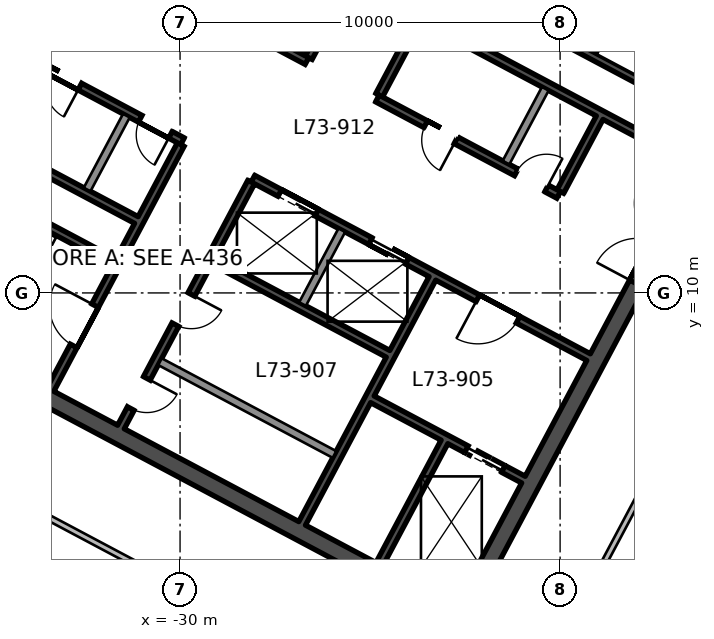
"""IFC4 building model, lengths in metres.
Left out: names, types, materials, properties, quantities, classifications, styles, units other than length and angle.
Written with IfcOpenShell. Run it as: python <this file> out.ifc"""

import sys

from ifc_helpers import new_model, si_unit, direction, frame, frame_2d, origin, place, context, subcontext, project, spatial, rectangle, extrude, element, fill, save


model = new_model("IFC4")
c1 = context("Model", 3, precision=1e-05, world=origin(), true_north=direction((0.0, 1.0)))
c2 = subcontext(c1, "Body", "Model", "MODEL_VIEW")
j1 = project(units=[si_unit("LENGTHUNIT", "METRE"), si_unit("PLANEANGLEUNIT", "RADIAN")], contexts=[c1])
p1 = place(None, origin())
s1 = spatial("IfcSite", under=j1, at=p1, CompositionType="ELEMENT")
p2 = place(p1, origin())
s2 = spatial("IfcBuilding", under=s1, at=p2, CompositionType="ELEMENT")
p3 = place(p2, frame((0.0, 0.0, 320.4)))
s3 = spatial("IfcBuildingStorey", under=s2, at=p3, CompositionType="ELEMENT", Elevation=320.4)
p4 = place(p3, frame((-13.771, 18.138, 0.0), z_axis=(0.0, 0.0, 1.0), x_axis=(-0.469467968382, -0.882949504028, 0.0)))
e1 = element("IfcWall", 1, at=p4, inside=s3, PredefinedType="SHEAR", context=c2, shape_type="SweptSolid", body=[
    extrude(rectangle(XDim=19.1, YDim=0.45, at=frame_2d((9.55, 0.0))), origin(), (0.0, 0.0, 1.0), 3.9),
])
p5 = place(p4, frame((6.55, 0.0, 0.0)))
e2 = element("IfcOpeningElement", 2, at=p5, cuts=e1, PredefinedType="OPENING", context=c2, shape_type="SweptSolid", body=[
    extrude(rectangle(XDim=2.4, YDim=2.4, at=frame_2d((1.2, 1.2))), frame((0.0, 0.235, 0.0), z_axis=(0.0, -1.0, 0.0), x_axis=(1.0, 0.0, 0.0)), (0.0, 0.0, 1.0), 0.47),
])
p6 = place(p3, frame((-32.004, 27.833, 0.0), z_axis=(0.0, 0.0, 1.0), x_axis=(-0.469467968382, -0.882949504028, 0.0)))
e3 = element("IfcWall", 3, at=p6, inside=s3, PredefinedType="SHEAR", context=c2, shape_type="SweptSolid", body=[
    extrude(rectangle(XDim=19.1, YDim=0.45, at=frame_2d((9.55, 0.0))), origin(), (0.0, 0.0, 1.0), 3.9),
])
p7 = place(p6, frame((10.15, 0.0, 0.0)))
e4 = element("IfcOpeningElement", 4, at=p7, cuts=e3, PredefinedType="OPENING", context=c2, shape_type="SweptSolid", body=[
    extrude(rectangle(XDim=2.4, YDim=2.4, at=frame_2d((1.2, 1.2))), frame((0.0, 0.235, 0.0), z_axis=(0.0, -1.0, 0.0), x_axis=(1.0, 0.0, 0.0)), (0.0, 0.0, 1.0), 0.47),
])
p8 = place(p3, frame((-22.832, 1.578, 0.0), z_axis=(0.0, 0.0, 1.0), x_axis=(-0.88294509198, 0.469476266226, 0.0)))
e5 = element("IfcWall", 5, at=p8, inside=s3, PredefinedType="SHEAR", context=c2, shape_type="SweptSolid", body=[
    extrude(rectangle(XDim=20.2, YDim=0.45, at=frame_2d((10.1, 0.0))), origin(), (0.0, 0.0, 1.0), 3.9),
])
p9 = place(p3, frame((-23.043, 6.08, 0.0), z_axis=(0.0, 0.0, 1.0), x_axis=(-0.469494272526, -0.882935517501, 0.0)))
e6 = element("IfcWall", 6, at=p9, inside=s3, PredefinedType="SHEAR", context=c2, shape_type="SweptSolid", body=[
    extrude(rectangle(XDim=3.65, YDim=0.2, at=frame_2d((1.825, 0.0))), origin(), (0.0, 0.0, 1.0), 3.9),
])
p10 = place(p3, frame((-18.96, 14.611, 0.0), z_axis=(0.0, 0.0, 1.0), x_axis=(-0.4694473164, -0.882960484464, 0.0)))
e7 = element("IfcWall", 7, at=p10, inside=s3, PredefinedType="SHEAR", context=c2, shape_type="SweptSolid", body=[
    extrude(rectangle(XDim=2.2, YDim=0.2, at=frame_2d((1.1, 0.0))), origin(), (0.0, 0.0, 1.0), 3.9),
])
p11 = place(p3, frame((-20.39, 15.372, 0.0), z_axis=(0.0, 0.0, 1.0), x_axis=(-0.4694473164, -0.882960484464, 0.0)))
e8 = element("IfcWall", 8, at=p11, inside=s3, PredefinedType="SOLIDWALL", context=c2, shape_type="SweptSolid", body=[
    extrude(rectangle(XDim=2.2, YDim=0.2, at=frame_2d((1.1, 0.0))), origin(), (0.0, 0.0, 1.0), 3.9),
])
p12 = place(p3, frame((-23.36, 10.382, 0.0), z_axis=(0.0, 0.0, 1.0), x_axis=(-0.469480409012, -0.88294288918, 0.0)))
e9 = element("IfcWall", 9, at=p12, inside=s3, PredefinedType="SHEAR", context=c2, shape_type="SweptSolid", body=[
    extrude(rectangle(XDim=7.3, YDim=0.2, at=frame_2d((3.65, 0.0))), origin(), (0.0, 0.0, 1.0), 3.9),
])
p13 = place(p3, frame((-25.744, 11.65, 0.0), z_axis=(0.0, 0.0, 1.0), x_axis=(-0.469487830541, -0.882938942948, 0.0)))
e10 = element("IfcWall", 10, at=p13, inside=s3, PredefinedType="SOLIDWALL", context=c2, shape_type="SweptSolid", body=[
    extrude(rectangle(XDim=2.2, YDim=0.2, at=frame_2d((1.1, 0.0))), origin(), (0.0, 0.0, 1.0), 3.9),
])
p14 = place(p3, frame((-21.333, 21.649, 0.0), z_axis=(0.0, 0.0, 1.0), x_axis=(-0.469494272526, -0.882935517501, 0.0)))
e11 = element("IfcWall", 11, at=p14, inside=s3, PredefinedType="SHEAR", context=c2, shape_type="SweptSolid", body=[
    extrude(rectangle(XDim=7.3, YDim=0.2, at=frame_2d((3.65, 0.0))), origin(), (0.0, 0.0, 1.0), 3.9),
])
p15 = place(p14, frame((1.3, 0.0, 0.0)))
e12 = element("IfcOpeningElement", 12, at=p15, cuts=e11, PredefinedType="OPENING", context=c2, shape_type="SweptSolid", body=[
    extrude(rectangle(XDim=1.2, YDim=2.1, at=frame_2d((0.6, 1.05))), frame((0.0, 0.11, 0.0), z_axis=(0.0, -1.0, 0.0), x_axis=(1.0, 0.0, 0.0)), (0.0, 0.0, 1.0), 0.22),
])
p16 = place(p3, frame((-28.128, 12.917, 0.0), z_axis=(0.0, 0.0, 1.0), x_axis=(-0.469454336211, -0.882956752176, 0.0)))
e13 = element("IfcWall", 13, at=p16, inside=s3, PredefinedType="SHEAR", context=c2, shape_type="SweptSolid", body=[
    extrude(rectangle(XDim=7.3, YDim=0.2, at=frame_2d((3.65, 0.0))), origin(), (0.0, 0.0, 1.0), 3.9),
])
p17 = place(p16, frame((3.35, 0.0, 0.0)))
e14 = element("IfcOpeningElement", 14, at=p17, cuts=e13, PredefinedType="OPENING", context=c2, shape_type="SweptSolid", body=[
    extrude(rectangle(XDim=0.9, YDim=2.1, at=frame_2d((0.45, 1.05))), frame((0.0, 0.11, 0.0), z_axis=(0.0, -1.0, 0.0), x_axis=(1.0, 0.0, 0.0)), (0.0, 0.0, 1.0), 0.22),
])
p18 = place(p16, frame((5.85, 0.0, 0.0)))
e15 = element("IfcOpeningElement", 15, at=p18, cuts=e13, PredefinedType="OPENING", context=c2, shape_type="SweptSolid", body=[
    extrude(rectangle(XDim=0.9, YDim=2.1, at=frame_2d((0.45, 1.05))), frame((0.0, 0.11, 0.0), z_axis=(0.0, -1.0, 0.0), x_axis=(1.0, 0.0, 0.0)), (0.0, 0.0, 1.0), 0.22),
])
p19 = place(p3, frame((-23.188, 22.635, 0.0), z_axis=(0.0, 0.0, 1.0), x_axis=(-0.469454336211, -0.882956752176, 0.0)))
e16 = element("IfcWall", 16, at=p19, inside=s3, PredefinedType="SHEAR", context=c2, shape_type="SweptSolid", body=[
    extrude(rectangle(XDim=7.3, YDim=0.2, at=frame_2d((3.65, 0.0))), origin(), (0.0, 0.0, 1.0), 3.9),
])
p20 = place(p19, frame((0.55, 0.0, 0.0)))
e17 = element("IfcOpeningElement", 17, at=p20, cuts=e16, PredefinedType="OPENING", context=c2, shape_type="SweptSolid", body=[
    extrude(rectangle(XDim=0.9, YDim=2.1, at=frame_2d((0.45, 1.05))), frame((0.0, 0.11, 0.0), z_axis=(0.0, -1.0, 0.0), x_axis=(1.0, 0.0, 0.0)), (0.0, 0.0, 1.0), 0.22),
])
p21 = place(p19, frame((2.3, 0.0, 0.0)))
e18 = element("IfcOpeningElement", 18, at=p21, cuts=e16, PredefinedType="OPENING", context=c2, shape_type="SweptSolid", body=[
    extrude(rectangle(XDim=0.9, YDim=2.1, at=frame_2d((0.45, 1.05))), frame((0.0, 0.11, 0.0), z_axis=(0.0, -1.0, 0.0), x_axis=(1.0, 0.0, 0.0)), (0.0, 0.0, 1.0), 0.22),
])
p22 = place(p19, frame((3.8, 0.0, 0.0)))
e19 = element("IfcOpeningElement", 19, at=p22, cuts=e16, PredefinedType="OPENING", context=c2, shape_type="SweptSolid", body=[
    extrude(rectangle(XDim=0.9, YDim=2.1, at=frame_2d((0.45, 1.05))), frame((0.0, 0.11, 0.0), z_axis=(0.0, -1.0, 0.0), x_axis=(1.0, 0.0, 0.0)), (0.0, 0.0, 1.0), 0.22),
])
p23 = place(p3, frame((-29.982, 13.903, 0.0), z_axis=(0.0, 0.0, 1.0), x_axis=(-0.469454336211, -0.882956752176, 0.0)))
e20 = element("IfcWall", 20, at=p23, inside=s3, PredefinedType="SHEAR", context=c2, shape_type="SweptSolid", body=[
    extrude(rectangle(XDim=7.3, YDim=0.2, at=frame_2d((3.65, 0.0))), origin(), (0.0, 0.0, 1.0), 3.9),
])
p24 = place(p23, frame((4.8, 0.0, 0.0)))
e21 = element("IfcOpeningElement", 21, at=p24, cuts=e20, PredefinedType="OPENING", context=c2, shape_type="SweptSolid", body=[
    extrude(rectangle(XDim=1.2, YDim=2.1, at=frame_2d((0.6, 1.05))), frame((0.0, 0.11, 0.0), z_axis=(0.0, -1.0, 0.0), x_axis=(1.0, 0.0, 0.0)), (0.0, 0.0, 1.0), 0.22),
])
p25 = place(p3, frame((-31.413, 14.664, 0.0), z_axis=(0.0, 0.0, 1.0), x_axis=(-0.469533832133, -0.882914480843, 0.0)))
e22 = element("IfcWall", 22, at=p25, inside=s3, PredefinedType="SOLIDWALL", context=c2, shape_type="SweptSolid", body=[
    extrude(rectangle(XDim=2.2, YDim=0.2, at=frame_2d((1.1, 0.0))), origin(), (0.0, 0.0, 1.0), 3.9),
])
p26 = place(p3, frame((-15.942, 14.536, 0.0), z_axis=(0.0, 0.0, 1.0), x_axis=(-0.882946947542, 0.469472776449, 0.0)))
e23 = element("IfcWall", 23, at=p26, inside=s3, PredefinedType="SHEAR", context=c2, shape_type="SweptSolid", body=[
    extrude(rectangle(XDim=8.0, YDim=0.2, at=frame_2d((4.0, 0.0))), origin(), (0.0, 0.0, 1.0), 3.9),
])
p27 = place(p3, frame((-16.529, 13.432, 0.0), z_axis=(0.0, 0.0, 1.0), x_axis=(-0.88295287151, 0.469461634952, 0.0)))
e24 = element("IfcWall", 24, at=p27, inside=s3, PredefinedType="SHEAR", context=c2, shape_type="SweptSolid", body=[
    extrude(rectangle(XDim=8.0, YDim=0.2, at=frame_2d((4.0, 0.0))), origin(), (0.0, 0.0, 1.0), 3.9),
])
p28 = place(p3, frame((-20.04, 12.581, 0.0), z_axis=(0.0, 0.0, 1.0), x_axis=(-0.882942972946, 0.469480251476, 0.0)))
e25 = element("IfcWall", 25, at=p28, inside=s3, PredefinedType="SHEAR", context=c2, shape_type="SweptSolid", body=[
    extrude(rectangle(XDim=5.4, YDim=0.2, at=frame_2d((2.7, 0.0))), origin(), (0.0, 0.0, 1.0), 3.9),
])
p29 = place(p28, frame((0.36, 0.0, 0.0)))
e26 = element("IfcOpeningElement", 26, at=p29, cuts=e25, PredefinedType="OPENING", context=c2, shape_type="SweptSolid", body=[
    extrude(rectangle(XDim=0.9, YDim=2.1, at=frame_2d((0.45, 1.05))), frame((0.0, 0.11, 0.0), z_axis=(0.0, -1.0, 0.0), x_axis=(1.0, 0.0, 0.0)), (0.0, 0.0, 1.0), 0.22),
])
p30 = place(p28, frame((3.06, 0.0, 0.0)))
e27 = element("IfcOpeningElement", 27, at=p30, cuts=e25, PredefinedType="OPENING", context=c2, shape_type="SweptSolid", body=[
    extrude(rectangle(XDim=0.9, YDim=2.1, at=frame_2d((0.45, 1.05))), frame((0.0, 0.11, 0.0), z_axis=(0.0, -1.0, 0.0), x_axis=(1.0, 0.0, 0.0)), (0.0, 0.0, 1.0), 0.22),
])
p31 = place(p3, frame((-26.662, 16.102, 0.0), z_axis=(0.0, 0.0, 1.0), x_axis=(-0.882940221191, 0.469485426614, 0.0)))
e28 = element("IfcWall", 28, at=p31, inside=s3, PredefinedType="SHEAR", context=c2, shape_type="SweptSolid", body=[
    extrude(rectangle(XDim=10.0, YDim=0.2, at=frame_2d((5.0, 0.0))), origin(), (0.0, 0.0, 1.0), 3.9),
])
p32 = place(p31, frame((6.3, 0.0, 0.0)))
e29 = element("IfcOpeningElement", 29, at=p32, cuts=e28, PredefinedType="OPENING", context=c2, shape_type="SweptSolid", body=[
    extrude(rectangle(XDim=1.2, YDim=2.1, at=frame_2d((0.6, 1.05))), frame((0.0, 0.11, 0.0), z_axis=(0.0, -1.0, 0.0), x_axis=(1.0, 0.0, 0.0)), (0.0, 0.0, 1.0), 0.22),
])
p33 = place(p31, frame((0.8, 0.0, 0.0)))
e30 = element("IfcOpeningElement", 30, at=p33, cuts=e28, PredefinedType="OPENING", context=c2, shape_type="SweptSolid", body=[
    extrude(rectangle(XDim=1.1, YDim=2.1, at=frame_2d((0.55, 1.05))), frame((0.0, 0.11, 0.0), z_axis=(0.0, -1.0, 0.0), x_axis=(1.0, 0.0, 0.0)), (0.0, 0.0, 1.0), 0.22),
])
p34 = place(p31, frame((3.5, 0.0, 0.0)))
e31 = element("IfcOpeningElement", 31, at=p34, cuts=e28, PredefinedType="OPENING", context=c2, shape_type="SweptSolid", body=[
    extrude(rectangle(XDim=1.1, YDim=2.1, at=frame_2d((0.55, 1.05))), frame((0.0, 0.11, 0.0), z_axis=(0.0, -1.0, 0.0), x_axis=(1.0, 0.0, 0.0)), (0.0, 0.0, 1.0), 0.22),
])
p35 = place(p3, frame((-19.252, 8.311, 0.0), z_axis=(0.0, 0.0, 1.0), x_axis=(-0.882955722218, 0.469456273365, 0.0)))
e32 = element("IfcWall", 32, at=p35, inside=s3, PredefinedType="SHEAR", context=c2, shape_type="SweptSolid", body=[
    extrude(rectangle(XDim=10.0, YDim=0.2, at=frame_2d((5.0, 0.0))), origin(), (0.0, 0.0, 1.0), 3.9),
])
p36 = place(p35, frame((2.1, 0.0, 0.0)))
e33 = element("IfcOpeningElement", 33, at=p36, cuts=e32, PredefinedType="OPENING", context=c2, shape_type="SweptSolid", body=[
    extrude(rectangle(XDim=1.2, YDim=2.1, at=frame_2d((0.6, 1.05))), frame((0.0, 0.11, 0.0), z_axis=(0.0, -1.0, 0.0), x_axis=(1.0, 0.0, 0.0)), (0.0, 0.0, 1.0), 0.22),
])
p37 = place(p35, frame((5.4, 0.0, 0.0)))
e34 = element("IfcOpeningElement", 34, at=p37, cuts=e32, PredefinedType="OPENING", context=c2, shape_type="SweptSolid", body=[
    extrude(rectangle(XDim=1.1, YDim=2.1, at=frame_2d((0.55, 1.05))), frame((0.0, 0.11, 0.0), z_axis=(0.0, -1.0, 0.0), x_axis=(1.0, 0.0, 0.0)), (0.0, 0.0, 1.0), 0.22),
])
p38 = place(p35, frame((8.1, 0.0, 0.0)))
e35 = element("IfcOpeningElement", 35, at=p38, cuts=e32, PredefinedType="OPENING", context=c2, shape_type="SweptSolid", body=[
    extrude(rectangle(XDim=1.1, YDim=2.1, at=frame_2d((0.55, 1.05))), frame((0.0, 0.11, 0.0), z_axis=(0.0, -1.0, 0.0), x_axis=(1.0, 0.0, 0.0)), (0.0, 0.0, 1.0), 0.22),
])
p39 = place(p3, frame((-29.935, 13.991, 0.0), z_axis=(0.0, 0.0, 1.0), x_axis=(-0.882952937579, 0.469461510692, 0.0)))
e36 = element("IfcWall", 36, at=p39, inside=s3, PredefinedType="SHEAR", context=c2, shape_type="SweptSolid", body=[
    extrude(rectangle(XDim=5.4, YDim=0.2, at=frame_2d((2.7, 0.0))), origin(), (0.0, 0.0, 1.0), 3.9),
])
p40 = place(p39, frame((0.36, 0.0, 0.0)))
e37 = element("IfcOpeningElement", 37, at=p40, cuts=e36, PredefinedType="OPENING", context=c2, shape_type="SweptSolid", body=[
    extrude(rectangle(XDim=0.9, YDim=2.1, at=frame_2d((0.45, 1.05))), frame((0.0, 0.11, 0.0), z_axis=(0.0, -1.0, 0.0), x_axis=(1.0, 0.0, 0.0)), (0.0, 0.0, 1.0), 0.22),
])
p41 = place(p39, frame((3.06, 0.0, 0.0)))
e38 = element("IfcOpeningElement", 38, at=p41, cuts=e36, PredefinedType="OPENING", context=c2, shape_type="SweptSolid", body=[
    extrude(rectangle(XDim=0.9, YDim=2.1, at=frame_2d((0.45, 1.05))), frame((0.0, 0.11, 0.0), z_axis=(0.0, -1.0, 0.0), x_axis=(1.0, 0.0, 0.0)), (0.0, 0.0, 1.0), 0.22),
])
p42 = place(p3, frame((-24.528, 8.398, 0.0), z_axis=(0.0, 0.0, 1.0), x_axis=(-0.882953967957, 0.469459572775, 0.0)))
e39 = element("IfcWall", 39, at=p42, inside=s3, PredefinedType="SHEAR", context=c2, shape_type="SweptSolid", body=[
    extrude(rectangle(XDim=5.2, YDim=0.2, at=frame_2d((2.6, 0.0))), origin(), (0.0, 0.0, 1.0), 3.9),
])
p43 = place(p3, frame((-31.15, 11.919, 0.0), z_axis=(0.0, 0.0, 1.0), x_axis=(-0.882940221191, 0.469485426614, 0.0)))
e40 = element("IfcWall", 40, at=p43, inside=s3, PredefinedType="SHEAR", context=c2, shape_type="SweptSolid", body=[
    extrude(rectangle(XDim=8.0, YDim=0.2, at=frame_2d((4.0, 0.0))), origin(), (0.0, 0.0, 1.0), 3.9),
])
p44 = place(p3, frame((-20.965, 5.088, 0.0), z_axis=(0.0, 0.0, 1.0), x_axis=(-0.882925986334, 0.469512196493, 0.0)))
e41 = element("IfcWall", 41, at=p44, inside=s3, PredefinedType="SHEAR", context=c2, shape_type="SweptSolid", body=[
    extrude(rectangle(XDim=4.5, YDim=0.2, at=frame_2d((2.25, 0.0))), origin(), (0.0, 0.0, 1.0), 3.9),
])
p45 = place(p44, frame((0.6, 0.0, 0.0)))
e42 = element("IfcOpeningElement", 42, at=p45, cuts=e41, PredefinedType="OPENING", context=c2, shape_type="SweptSolid", body=[
    extrude(rectangle(XDim=1.1, YDim=2.1, at=frame_2d((0.55, 1.05))), frame((0.0, 0.11, 0.0), z_axis=(0.0, -1.0, 0.0), x_axis=(1.0, 0.0, 0.0)), (0.0, 0.0, 1.0), 0.22),
])
p46 = place(p3, frame((-31.737, 10.816, 0.0), z_axis=(0.0, 0.0, 1.0), x_axis=(-0.882940221191, 0.469485426614, 0.0)))
e43 = element("IfcWall", 43, at=p46, inside=s3, PredefinedType="SHEAR", context=c2, shape_type="SweptSolid", body=[
    extrude(rectangle(XDim=8.0, YDim=0.2, at=frame_2d((4.0, 0.0))), origin(), (0.0, 0.0, 1.0), 3.9),
])
p47 = place(p3, frame((-25.937, 5.75, 0.0), z_axis=(0.0, 0.0, 1.0), x_axis=(-0.882934506056, 0.469496174655, 0.0)))
e44 = element("IfcWall", 44, at=p47, inside=s3, PredefinedType="SOLIDWALL", context=c2, shape_type="SweptSolid", body=[
    extrude(rectangle(XDim=5.2, YDim=0.2, at=frame_2d((2.6, 0.0))), origin(), (0.0, 0.0, 1.0), 3.9),
])
p48 = place(p3, frame((-48.947, 39.73, 0.0), z_axis=(0.0, 0.0, 1.0), x_axis=(0.882945454821, -0.469475583828, 0.0)))
e45 = element("IfcWall", 45, at=p48, inside=s3, PredefinedType="PARTITIONING", context=c2, shape_type="SweptSolid", body=[
    extrude(rectangle(XDim=55.436, YDim=0.15, at=frame_2d((27.718, 0.0))), origin(), (0.0, 0.0, 1.0), 3.54),
])
p49 = place(p48, frame((28.35, 0.0, 0.0)))
e46 = element("IfcOpeningElement", 46, at=p49, cuts=e45, PredefinedType="OPENING", context=c2, shape_type="SweptSolid", body=[
    extrude(rectangle(XDim=1.8, YDim=2.1, at=frame_2d((0.9, 1.05))), frame((0.0, 0.085, 0.0), z_axis=(0.0, -1.0, 0.0), x_axis=(1.0, 0.0, 0.0)), (0.0, 0.0, 1.0), 0.17),
])
p50 = place(p48, frame((26.7, 0.0, 0.0)))
e47 = element("IfcOpeningElement", 47, at=p50, cuts=e45, PredefinedType="OPENING", context=c2, shape_type="SweptSolid", body=[
    extrude(rectangle(XDim=1.0, YDim=2.1, at=frame_2d((0.5, 1.05))), frame((0.0, 0.085, 0.0), z_axis=(0.0, -1.0, 0.0), x_axis=(1.0, 0.0, 0.0)), (0.0, 0.0, 1.0), 0.17),
])
p51 = place(p48, frame((15.65, 0.0, 0.0)))
e48 = element("IfcOpeningElement", 48, at=p51, cuts=e45, PredefinedType="OPENING", context=c2, shape_type="SweptSolid", body=[
    extrude(rectangle(XDim=1.0, YDim=2.1, at=frame_2d((0.5, 1.05))), frame((0.0, 0.085, 0.0), z_axis=(0.0, -1.0, 0.0), x_axis=(1.0, 0.0, 0.0)), (0.0, 0.0, 1.0), 0.17),
])
p52 = place(p3, frame((-28.454, 1.425, 0.0), z_axis=(0.0, 0.0, 1.0), x_axis=(-0.882958686675, 0.469450697757, 0.0)))
e49 = element("IfcWall", 49, at=p52, inside=s3, PredefinedType="PARTITIONING", context=c2, shape_type="SweptSolid", body=[
    extrude(rectangle(XDim=19.612, YDim=0.15, at=frame_2d((9.806, 0.0))), origin(), (0.0, 0.0, 1.0), 3.54),
])
p53 = place(p52, frame((9.35, 0.0, 0.0)))
e50 = element("IfcOpeningElement", 50, at=p53, cuts=e49, PredefinedType="OPENING", context=c2, shape_type="SweptSolid", body=[
    extrude(rectangle(XDim=1.0, YDim=2.1, at=frame_2d((0.5, 1.05))), frame((0.0, 0.085, 0.0), z_axis=(0.0, -1.0, 0.0), x_axis=(1.0, 0.0, 0.0)), (0.0, 0.0, 1.0), 0.17),
])
p54 = place(p3, frame((-20.588, -0.379, 0.0), z_axis=(0.0, 0.0, 1.0), x_axis=(0.469489882812, 0.882937851685, 0.0)))
e51 = element("IfcWall", 51, at=p54, inside=s3, PredefinedType="PARTITIONING", context=c2, shape_type="SweptSolid", body=[
    extrude(rectangle(XDim=20.0, YDim=0.15, at=frame_2d((10.0, 0.0))), origin(), (0.0, 0.0, 1.0), 3.54),
])
p55 = place(p54, frame((9.55, 0.0, 0.0)))
e52 = element("IfcOpeningElement", 52, at=p55, cuts=e51, PredefinedType="OPENING", context=c2, shape_type="SweptSolid", body=[
    extrude(rectangle(XDim=1.0, YDim=2.1, at=frame_2d((0.5, 1.05))), frame((0.0, 0.085, 0.0), z_axis=(0.0, -1.0, 0.0), x_axis=(1.0, 0.0, 0.0)), (0.0, 0.0, 1.0), 0.17),
])
p56 = place(p36, origin())
e53 = element("IfcDoor", 53, at=p56, inside=s3, OperationType="SINGLE_SWING_RIGHT", PredefinedType="DOOR", context=c2, shape_type="SweptSolid", body=[
    extrude(rectangle(XDim=1.2, YDim=2.1, at=frame_2d((0.6, 1.05))), frame((0.0, 0.025, 0.0), z_axis=(0.0, -1.0, 0.0), x_axis=(1.0, 0.0, 0.0)), (0.0, 0.0, 1.0), 0.05),
])
fill(e33, e53)
p57 = place(p24, frame((1.2, 0.0, 0.0), z_axis=(0.0, 0.0, 1.0), x_axis=(-1.0, 0.0, 0.0)))
e54 = element("IfcDoor", 54, at=p57, inside=s3, OperationType="SINGLE_SWING_RIGHT", PredefinedType="DOOR", context=c2, shape_type="SweptSolid", body=[
    extrude(rectangle(XDim=1.2, YDim=2.1, at=frame_2d((0.6, 1.05))), frame((0.0, 0.025, 0.0), z_axis=(0.0, -1.0, 0.0), x_axis=(1.0, 0.0, 0.0)), (0.0, 0.0, 1.0), 0.05),
])
fill(e21, e54)
p58 = place(p40, origin())
e55 = element("IfcDoor", 55, at=p58, inside=s3, OperationType="SINGLE_SWING_LEFT", PredefinedType="DOOR", context=c2, shape_type="SweptSolid", body=[
    extrude(rectangle(XDim=0.9, YDim=2.1, at=frame_2d((0.45, 1.05))), frame((0.0, 0.025, 0.0), z_axis=(0.0, -1.0, 0.0), x_axis=(1.0, 0.0, 0.0)), (0.0, 0.0, 1.0), 0.05),
])
fill(e37, e55)
p59 = place(p41, origin())
e56 = element("IfcDoor", 56, at=p59, inside=s3, OperationType="SINGLE_SWING_LEFT", PredefinedType="DOOR", context=c2, shape_type="SweptSolid", body=[
    extrude(rectangle(XDim=0.9, YDim=2.1, at=frame_2d((0.45, 1.05))), frame((0.0, 0.025, 0.0), z_axis=(0.0, -1.0, 0.0), x_axis=(1.0, 0.0, 0.0)), (0.0, 0.0, 1.0), 0.05),
])
fill(e38, e56)
p60 = place(p29, frame((0.9, 0.0, 0.0), z_axis=(0.0, 0.0, 1.0), x_axis=(-1.0, 0.0, 0.0)))
e57 = element("IfcDoor", 57, at=p60, inside=s3, OperationType="SINGLE_SWING_RIGHT", PredefinedType="DOOR", context=c2, shape_type="SweptSolid", body=[
    extrude(rectangle(XDim=0.9, YDim=2.1, at=frame_2d((0.45, 1.05))), frame((0.0, 0.025, 0.0), z_axis=(0.0, -1.0, 0.0), x_axis=(1.0, 0.0, 0.0)), (0.0, 0.0, 1.0), 0.05),
])
fill(e26, e57)
p61 = place(p30, origin())
e58 = element("IfcDoor", 58, at=p61, inside=s3, OperationType="SINGLE_SWING_LEFT", PredefinedType="DOOR", context=c2, shape_type="SweptSolid", body=[
    extrude(rectangle(XDim=0.9, YDim=2.1, at=frame_2d((0.45, 1.05))), frame((0.0, 0.025, 0.0), z_axis=(0.0, -1.0, 0.0), x_axis=(1.0, 0.0, 0.0)), (0.0, 0.0, 1.0), 0.05),
])
fill(e27, e58)
p62 = place(p37, origin())
e59 = element("IfcDoor", 59, at=p62, inside=s3, OperationType="DOUBLE_DOOR_SLIDING", PredefinedType="DOOR", context=c2, shape_type="SweptSolid", body=[
    extrude(rectangle(XDim=1.1, YDim=2.1, at=frame_2d((0.55, 1.05))), frame((0.0, 0.025, 0.0), z_axis=(0.0, -1.0, 0.0), x_axis=(1.0, 0.0, 0.0)), (0.0, 0.0, 1.0), 0.05),
])
fill(e34, e59)
p63 = place(p38, origin())
e60 = element("IfcDoor", 60, at=p63, inside=s3, OperationType="DOUBLE_DOOR_SLIDING", PredefinedType="DOOR", context=c2, shape_type="SweptSolid", body=[
    extrude(rectangle(XDim=1.1, YDim=2.1, at=frame_2d((0.55, 1.05))), frame((0.0, 0.025, 0.0), z_axis=(0.0, -1.0, 0.0), x_axis=(1.0, 0.0, 0.0)), (0.0, 0.0, 1.0), 0.05),
])
fill(e35, e60)
p64 = place(p45, origin())
e61 = element("IfcDoor", 61, at=p64, inside=s3, OperationType="DOUBLE_DOOR_SLIDING", PredefinedType="DOOR", context=c2, shape_type="SweptSolid", body=[
    extrude(rectangle(XDim=1.1, YDim=2.1, at=frame_2d((0.55, 1.05))), frame((0.0, 0.025, 0.0), z_axis=(0.0, -1.0, 0.0), x_axis=(1.0, 0.0, 0.0)), (0.0, 0.0, 1.0), 0.05),
])
fill(e42, e61)
p65 = place(p17, origin())
e62 = element("IfcDoor", 62, at=p65, inside=s3, OperationType="SINGLE_SWING_LEFT", PredefinedType="DOOR", context=c2, shape_type="SweptSolid", body=[
    extrude(rectangle(XDim=0.9, YDim=2.1, at=frame_2d((0.45, 1.05))), frame((0.0, 0.025, 0.0), z_axis=(0.0, -1.0, 0.0), x_axis=(1.0, 0.0, 0.0)), (0.0, 0.0, 1.0), 0.05),
])
fill(e14, e62)
p66 = place(p18, origin())
e63 = element("IfcDoor", 63, at=p66, inside=s3, OperationType="SINGLE_SWING_LEFT", PredefinedType="DOOR", context=c2, shape_type="SweptSolid", body=[
    extrude(rectangle(XDim=0.9, YDim=2.1, at=frame_2d((0.45, 1.05))), frame((0.0, 0.025, 0.0), z_axis=(0.0, -1.0, 0.0), x_axis=(1.0, 0.0, 0.0)), (0.0, 0.0, 1.0), 0.05),
])
fill(e15, e63)
save(model, sys.argv[1])
